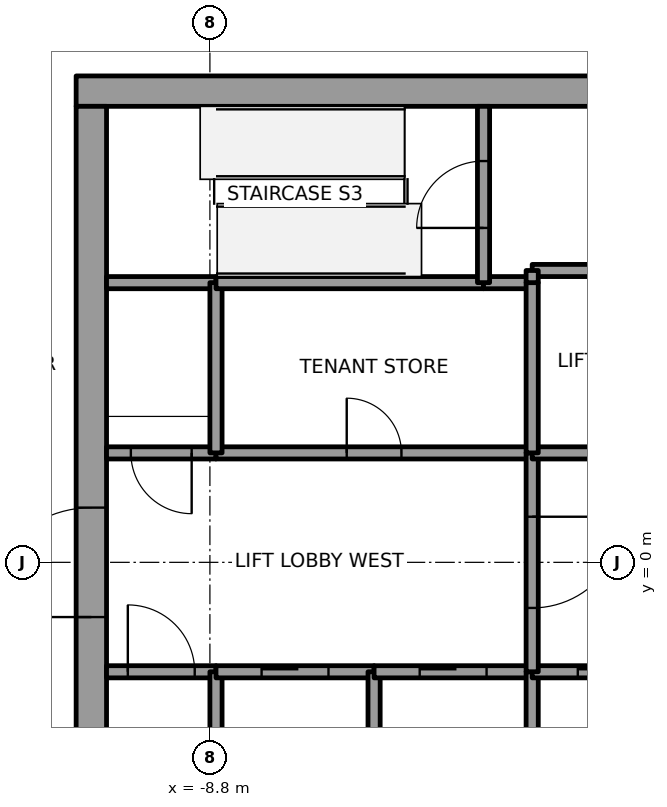
"""IFC4 building model, lengths in metres.
Left out: names, types, materials, properties, quantities, classifications, styles, units other than length and angle.
Written with IfcOpenShell. Run it as: python <this file> out.ifc"""

import sys

from ifc_helpers import new_model, si_unit, direction, frame, frame_2d, origin, place, context, subcontext, project, spatial, rectangle, extrude, element, fill, save


model = new_model("IFC4")
c1 = context("Model", 3, precision=1e-05, world=origin(), true_north=direction((0.0, 1.0)))
c2 = subcontext(c1, "Body", "Model", "MODEL_VIEW")
j1 = project(units=[si_unit("LENGTHUNIT", "METRE"), si_unit("PLANEANGLEUNIT", "RADIAN")], contexts=[c1])
p1 = place(None, origin())
s1 = spatial("IfcSite", under=j1, at=p1, CompositionType="ELEMENT")
p2 = place(p1, origin())
s2 = spatial("IfcBuilding", under=s1, at=p2, CompositionType="ELEMENT")
p3 = place(p2, frame((0.0, 0.0, 263.0)))
s3 = spatial("IfcBuildingStorey", under=s2, at=p3, CompositionType="ELEMENT", Elevation=263.0)
p4 = place(p3, frame((-11.0, 7.75, 0.0), z_axis=(0.0, 0.0, 1.0), x_axis=(1.0, 0.0, 0.0)))
e1 = element("IfcWall", 1, at=p4, inside=s3, PredefinedType="SHEAR", context=c2, shape_type="SweptSolid", body=[
    extrude(rectangle(XDim=22.0, YDim=0.5, at=frame_2d((11.0, 0.0))), origin(), (0.0, 0.0, 1.0), 4.0),
])
p5 = place(p4, frame((10.45, 0.0, 0.0)))
e2 = element("IfcOpeningElement", 2, at=p5, cuts=e1, PredefinedType="OPENING", context=c2, shape_type="SweptSolid", body=[
    extrude(rectangle(XDim=1.1, YDim=2.1, at=frame_2d((0.55, 1.05))), frame((0.0, 0.25, 0.0), z_axis=(0.0, -1.0, 0.0), x_axis=(1.0, 0.0, 0.0)), (0.0, 0.0, 1.0), 0.5),
])
p6 = place(p3, frame((-10.75, -7.5, 0.0), z_axis=(0.0, 0.0, 1.0), x_axis=(0.0, 1.0, 0.0)))
e3 = element("IfcWall", 3, at=p6, inside=s3, PredefinedType="SHEAR", context=c2, shape_type="SweptSolid", body=[
    extrude(rectangle(XDim=15.0, YDim=0.5, at=frame_2d((7.5, 0.0))), origin(), (0.0, 0.0, 1.0), 4.0),
])
p7 = place(p6, frame((6.6, 0.0, 0.0)))
e4 = element("IfcOpeningElement", 4, at=p7, cuts=e3, PredefinedType="OPENING", context=c2, shape_type="SweptSolid", body=[
    extrude(rectangle(XDim=1.8, YDim=2.1, at=frame_2d((0.9, 1.05))), frame((0.0, 0.25, 0.0), z_axis=(0.0, -1.0, 0.0), x_axis=(1.0, 0.0, 0.0)), (0.0, 0.0, 1.0), 0.5),
])
p8 = place(p3, frame((-10.5, -1.8, 0.0), z_axis=(0.0, 0.0, 1.0), x_axis=(1.0, 0.0, 0.0)))
e5 = element("IfcWall", 5, at=p8, inside=s3, PredefinedType="SOLIDWALL", context=c2, shape_type="SweptSolid", body=[
    extrude(rectangle(XDim=1.8, YDim=0.2, at=frame_2d((0.9, 0.0))), origin(), (0.0, 0.0, 1.0), 3.85),
])
p9 = place(p8, frame((0.35, 0.0, 0.0)))
e6 = element("IfcOpeningElement", 6, at=p9, cuts=e5, PredefinedType="OPENING", context=c2, shape_type="SweptSolid", body=[
    extrude(rectangle(XDim=1.1, YDim=2.1, at=frame_2d((0.55, 1.05))), frame((0.0, 0.1, 0.0), z_axis=(0.0, -1.0, 0.0), x_axis=(1.0, 0.0, 0.0)), (0.0, 0.0, 1.0), 0.2),
])
p10 = place(p3, frame((-8.7, 1.8, 0.0), z_axis=(0.0, 0.0, 1.0), x_axis=(-1.0, 0.0, 0.0)))
e7 = element("IfcWall", 7, at=p10, inside=s3, PredefinedType="SOLIDWALL", context=c2, shape_type="SweptSolid", body=[
    extrude(rectangle(XDim=1.8, YDim=0.2, at=frame_2d((0.9, 0.0))), origin(), (0.0, 0.0, 1.0), 3.85),
])
p11 = place(p10, frame((0.4, 0.0, 0.0)))
e8 = element("IfcOpeningElement", 8, at=p11, cuts=e7, PredefinedType="OPENING", context=c2, shape_type="SweptSolid", body=[
    extrude(rectangle(XDim=1.0, YDim=2.1, at=frame_2d((0.5, 1.05))), frame((0.0, 0.1, 0.0), z_axis=(0.0, -1.0, 0.0), x_axis=(1.0, 0.0, 0.0)), (0.0, 0.0, 1.0), 0.2),
])
p12 = place(p3, frame((-8.7, 4.6, 0.0), z_axis=(0.0, 0.0, 1.0), x_axis=(-1.0, 0.0, 0.0)))
e9 = element("IfcWall", 9, at=p12, inside=s3, PredefinedType="SOLIDWALL", context=c2, shape_type="SweptSolid", body=[
    extrude(rectangle(XDim=1.8, YDim=0.2, at=frame_2d((0.9, 0.0))), origin(), (0.0, 0.0, 1.0), 3.85),
])
p13 = place(p3, frame((-8.7, -4.6, 0.0), z_axis=(0.0, 0.0, 1.0), x_axis=(0.0, 1.0, 0.0)))
e10 = element("IfcWall", 10, at=p13, inside=s3, PredefinedType="SOLIDWALL", context=c2, shape_type="SweptSolid", body=[
    extrude(rectangle(XDim=2.8, YDim=0.2, at=frame_2d((1.4, 0.0))), origin(), (0.0, 0.0, 1.0), 3.85),
])
p14 = place(p3, frame((-8.7, -1.8, 0.0), z_axis=(0.0, 0.0, 1.0), x_axis=(1.0, 0.0, 0.0)))
e11 = element("IfcWall", 11, at=p14, inside=s3, PredefinedType="SOLIDWALL", context=c2, shape_type="SweptSolid", body=[
    extrude(rectangle(XDim=2.6, YDim=0.2, at=frame_2d((1.3, 0.0))), origin(), (0.0, 0.0, 1.0), 3.85),
])
p15 = place(p14, frame((0.75, 0.0, 0.0)))
e12 = element("IfcOpeningElement", 12, at=p15, cuts=e11, PredefinedType="OPENING", context=c2, shape_type="SweptSolid", body=[
    extrude(rectangle(XDim=1.1, YDim=2.1, at=frame_2d((0.55, 1.05))), frame((0.0, 0.1, 0.0), z_axis=(0.0, -1.0, 0.0), x_axis=(1.0, 0.0, 0.0)), (0.0, 0.0, 1.0), 0.2),
])
p16 = place(p3, frame((-8.7, 1.8, 0.0), z_axis=(0.0, 0.0, 1.0), x_axis=(1.0, 0.0, 0.0)))
e13 = element("IfcWall", 13, at=p16, inside=s3, PredefinedType="SOLIDWALL", context=c2, shape_type="SweptSolid", body=[
    extrude(rectangle(XDim=5.2, YDim=0.2, at=frame_2d((2.6, 0.0))), origin(), (0.0, 0.0, 1.0), 3.85),
])
p17 = place(p16, frame((2.15, 0.0, 0.0)))
e14 = element("IfcOpeningElement", 14, at=p17, cuts=e13, PredefinedType="OPENING", context=c2, shape_type="SweptSolid", body=[
    extrude(rectangle(XDim=0.9, YDim=2.1, at=frame_2d((0.45, 1.05))), frame((0.0, 0.1, 0.0), z_axis=(0.0, -1.0, 0.0), x_axis=(1.0, 0.0, 0.0)), (0.0, 0.0, 1.0), 0.2),
])
p18 = place(p3, frame((-8.7, 4.6, 0.0), z_axis=(0.0, 0.0, 1.0), x_axis=(0.0, -1.0, 0.0)))
e15 = element("IfcWall", 15, at=p18, inside=s3, PredefinedType="SOLIDWALL", context=c2, shape_type="SweptSolid", body=[
    extrude(rectangle(XDim=2.8, YDim=0.2, at=frame_2d((1.4, 0.0))), origin(), (0.0, 0.0, 1.0), 3.85),
])
p19 = place(p3, frame((-4.3, 4.6, 0.0), z_axis=(0.0, 0.0, 1.0), x_axis=(-1.0, 0.0, 0.0)))
e16 = element("IfcWall", 16, at=p19, inside=s3, PredefinedType="SOLIDWALL", context=c2, shape_type="SweptSolid", body=[
    extrude(rectangle(XDim=4.4, YDim=0.2, at=frame_2d((2.2, 0.0))), origin(), (0.0, 0.0, 1.0), 3.85),
])
p20 = place(p3, frame((-6.1, -4.6, 0.0), z_axis=(0.0, 0.0, 1.0), x_axis=(0.0, 1.0, 0.0)))
e17 = element("IfcWall", 17, at=p20, inside=s3, PredefinedType="SOLIDWALL", context=c2, shape_type="SweptSolid", body=[
    extrude(rectangle(XDim=2.8, YDim=0.2, at=frame_2d((1.4, 0.0))), origin(), (0.0, 0.0, 1.0), 3.85),
])
p21 = place(p3, frame((-6.1, -1.8, 0.0), z_axis=(0.0, 0.0, 1.0), x_axis=(1.0, 0.0, 0.0)))
e18 = element("IfcWall", 18, at=p21, inside=s3, PredefinedType="SOLIDWALL", context=c2, shape_type="SweptSolid", body=[
    extrude(rectangle(XDim=2.6, YDim=0.2, at=frame_2d((1.3, 0.0))), origin(), (0.0, 0.0, 1.0), 3.85),
])
p22 = place(p21, frame((0.75, 0.0, 0.0)))
e19 = element("IfcOpeningElement", 19, at=p22, cuts=e18, PredefinedType="OPENING", context=c2, shape_type="SweptSolid", body=[
    extrude(rectangle(XDim=1.1, YDim=2.1, at=frame_2d((0.55, 1.05))), frame((0.0, 0.1, 0.0), z_axis=(0.0, -1.0, 0.0), x_axis=(1.0, 0.0, 0.0)), (0.0, 0.0, 1.0), 0.2),
])
p23 = place(p3, frame((-3.5, 4.6, 0.0), z_axis=(0.0, 0.0, 1.0), x_axis=(-1.0, 0.0, 0.0)))
e20 = element("IfcWall", 20, at=p23, inside=s3, PredefinedType="SOLIDWALL", context=c2, shape_type="SweptSolid", body=[
    extrude(rectangle(XDim=0.8, YDim=0.2, at=frame_2d((0.4, 0.0))), origin(), (0.0, 0.0, 1.0), 3.85),
])
p24 = place(p3, frame((-4.3, 4.6, 0.0), z_axis=(0.0, 0.0, 1.0), x_axis=(0.0, 1.0, 0.0)))
e21 = element("IfcWall", 21, at=p24, inside=s3, PredefinedType="SOLIDWALL", context=c2, shape_type="SweptSolid", body=[
    extrude(rectangle(XDim=2.9, YDim=0.2, at=frame_2d((1.45, 0.0))), origin(), (0.0, 0.0, 1.0), 3.85),
])
p25 = place(p24, frame((0.9, 0.0, 0.0)))
e22 = element("IfcOpeningElement", 22, at=p25, cuts=e21, PredefinedType="OPENING", context=c2, shape_type="SweptSolid", body=[
    extrude(rectangle(XDim=1.1, YDim=2.1, at=frame_2d((0.55, 1.05))), frame((0.0, 0.1, 0.0), z_axis=(0.0, -1.0, 0.0), x_axis=(1.0, 0.0, 0.0)), (0.0, 0.0, 1.0), 0.2),
])
p26 = place(p3, frame((-3.5, -4.6, 0.0), z_axis=(0.0, 0.0, 1.0), x_axis=(0.0, 1.0, 0.0)))
e23 = element("IfcWall", 23, at=p26, inside=s3, PredefinedType="SOLIDWALL", context=c2, shape_type="SweptSolid", body=[
    extrude(rectangle(XDim=2.8, YDim=0.2, at=frame_2d((1.4, 0.0))), origin(), (0.0, 0.0, 1.0), 3.85),
])
p27 = place(p3, frame((-3.5, -1.8, 0.0), z_axis=(0.0, 0.0, 1.0), x_axis=(1.0, 0.0, 0.0)))
e24 = element("IfcWall", 24, at=p27, inside=s3, PredefinedType="SOLIDWALL", context=c2, shape_type="SweptSolid", body=[
    extrude(rectangle(XDim=2.6, YDim=0.2, at=frame_2d((1.3, 0.0))), origin(), (0.0, 0.0, 1.0), 3.85),
])
p28 = place(p27, frame((0.75, 0.0, 0.0)))
e25 = element("IfcOpeningElement", 25, at=p28, cuts=e24, PredefinedType="OPENING", context=c2, shape_type="SweptSolid", body=[
    extrude(rectangle(XDim=1.1, YDim=2.1, at=frame_2d((0.55, 1.05))), frame((0.0, 0.1, 0.0), z_axis=(0.0, -1.0, 0.0), x_axis=(1.0, 0.0, 0.0)), (0.0, 0.0, 1.0), 0.2),
])
p29 = place(p3, frame((-3.5, 1.8, 0.0), z_axis=(0.0, 0.0, 1.0), x_axis=(0.0, -1.0, 0.0)))
e26 = element("IfcWall", 26, at=p29, inside=s3, PredefinedType="SOLIDWALL", context=c2, shape_type="SweptSolid", body=[
    extrude(rectangle(XDim=3.6, YDim=0.2, at=frame_2d((1.8, 0.0))), origin(), (0.0, 0.0, 1.0), 3.85),
])
p30 = place(p29, frame((1.05, 0.0, 0.0)))
e27 = element("IfcOpeningElement", 27, at=p30, cuts=e26, PredefinedType="OPENING", context=c2, shape_type="SweptSolid", body=[
    extrude(rectangle(XDim=1.5, YDim=2.1, at=frame_2d((0.75, 1.05))), frame((0.0, 0.1, 0.0), z_axis=(0.0, -1.0, 0.0), x_axis=(1.0, 0.0, 0.0)), (0.0, 0.0, 1.0), 0.2),
])
p31 = place(p3, frame((-0.9, 1.8, 0.0), z_axis=(0.0, 0.0, 1.0), x_axis=(-1.0, 0.0, 0.0)))
e28 = element("IfcWall", 28, at=p31, inside=s3, PredefinedType="SOLIDWALL", context=c2, shape_type="SweptSolid", body=[
    extrude(rectangle(XDim=2.6, YDim=0.2, at=frame_2d((1.3, 0.0))), origin(), (0.0, 0.0, 1.0), 3.85),
])
p32 = place(p3, frame((-3.5, 1.8, 0.0), z_axis=(0.0, 0.0, 1.0), x_axis=(0.0, 1.0, 0.0)))
e29 = element("IfcWall", 29, at=p32, inside=s3, PredefinedType="SOLIDWALL", context=c2, shape_type="SweptSolid", body=[
    extrude(rectangle(XDim=2.8, YDim=0.2, at=frame_2d((1.4, 0.0))), origin(), (0.0, 0.0, 1.0), 3.85),
])
p33 = place(p3, frame((-0.9, 4.8, 0.0), z_axis=(0.0, 0.0, 1.0), x_axis=(-1.0, 0.0, 0.0)))
e30 = element("IfcWall", 30, at=p33, inside=s3, PredefinedType="SOLIDWALL", context=c2, shape_type="SweptSolid", body=[
    extrude(rectangle(XDim=2.6, YDim=0.2, at=frame_2d((1.3, 0.0))), origin(), (0.0, 0.0, 1.0), 3.85),
])
p34 = place(p3, frame((-3.5, 4.8, 0.0), z_axis=(0.0, 0.0, 1.0), x_axis=(0.0, -1.0, 0.0)))
e31 = element("IfcWall", 31, at=p34, inside=s3, PredefinedType="SOLIDWALL", context=c2, shape_type="SweptSolid", body=[
    extrude(rectangle(XDim=0.2, YDim=0.2, at=frame_2d((0.1, 0.0))), origin(), (0.0, 0.0, 1.0), 3.85),
])
p35 = place(p15, origin())
e32 = element("IfcDoor", 32, at=p35, inside=s3, OperationType="SLIDING_TO_RIGHT", PredefinedType="DOOR", context=c2, shape_type="SweptSolid", body=[
    extrude(rectangle(XDim=1.1, YDim=2.1, at=frame_2d((0.55, 1.05))), frame((0.0, 0.025, 0.0), z_axis=(0.0, -1.0, 0.0), x_axis=(1.0, 0.0, 0.0)), (0.0, 0.0, 1.0), 0.05),
])
fill(e12, e32)
p36 = place(p22, origin())
e33 = element("IfcDoor", 33, at=p36, inside=s3, OperationType="SLIDING_TO_RIGHT", PredefinedType="DOOR", context=c2, shape_type="SweptSolid", body=[
    extrude(rectangle(XDim=1.1, YDim=2.1, at=frame_2d((0.55, 1.05))), frame((0.0, 0.025, 0.0), z_axis=(0.0, -1.0, 0.0), x_axis=(1.0, 0.0, 0.0)), (0.0, 0.0, 1.0), 0.05),
])
fill(e19, e33)
p37 = place(p28, origin())
e34 = element("IfcDoor", 34, at=p37, inside=s3, OperationType="SLIDING_TO_LEFT", PredefinedType="DOOR", context=c2, shape_type="SweptSolid", body=[
    extrude(rectangle(XDim=1.1, YDim=2.1, at=frame_2d((0.55, 1.05))), frame((0.0, 0.025, 0.0), z_axis=(0.0, -1.0, 0.0), x_axis=(1.0, 0.0, 0.0)), (0.0, 0.0, 1.0), 0.05),
])
fill(e25, e34)
p38 = place(p30, origin())
e35 = element("IfcDoor", 35, at=p38, inside=s3, OperationType="DOUBLE_DOOR_SINGLE_SWING", PredefinedType="DOOR", context=c2, shape_type="SweptSolid", body=[
    extrude(rectangle(XDim=1.5, YDim=2.1, at=frame_2d((0.75, 1.05))), frame((0.0, 0.025, 0.0), z_axis=(0.0, -1.0, 0.0), x_axis=(1.0, 0.0, 0.0)), (0.0, 0.0, 1.0), 0.05),
])
fill(e27, e35)
p39 = place(p9, origin())
e36 = element("IfcDoor", 36, at=p39, inside=s3, OperationType="SINGLE_SWING_LEFT", PredefinedType="DOOR", context=c2, shape_type="SweptSolid", body=[
    extrude(rectangle(XDim=1.1, YDim=2.1, at=frame_2d((0.55, 1.05))), frame((0.0, 0.025, 0.0), z_axis=(0.0, -1.0, 0.0), x_axis=(1.0, 0.0, 0.0)), (0.0, 0.0, 1.0), 0.05),
])
fill(e6, e36)
p40 = place(p11, origin())
e37 = element("IfcDoor", 37, at=p40, inside=s3, OperationType="SINGLE_SWING_LEFT", PredefinedType="DOOR", context=c2, shape_type="SweptSolid", body=[
    extrude(rectangle(XDim=1.0, YDim=2.1, at=frame_2d((0.5, 1.05))), frame((0.0, 0.025, 0.0), z_axis=(0.0, -1.0, 0.0), x_axis=(1.0, 0.0, 0.0)), (0.0, 0.0, 1.0), 0.05),
])
fill(e8, e37)
p41 = place(p25, origin())
e38 = element("IfcDoor", 38, at=p41, inside=s3, OperationType="SINGLE_SWING_LEFT", PredefinedType="DOOR", context=c2, shape_type="SweptSolid", body=[
    extrude(rectangle(XDim=1.1, YDim=2.1, at=frame_2d((0.55, 1.05))), frame((0.0, 0.025, 0.0), z_axis=(0.0, -1.0, 0.0), x_axis=(1.0, 0.0, 0.0)), (0.0, 0.0, 1.0), 0.05),
])
fill(e22, e38)
p42 = place(p17, origin())
e39 = element("IfcDoor", 39, at=p42, inside=s3, OperationType="SINGLE_SWING_RIGHT", PredefinedType="DOOR", context=c2, shape_type="SweptSolid", body=[
    extrude(rectangle(XDim=0.9, YDim=2.1, at=frame_2d((0.45, 1.05))), frame((0.0, 0.025, 0.0), z_axis=(0.0, -1.0, 0.0), x_axis=(1.0, 0.0, 0.0)), (0.0, 0.0, 1.0), 0.05),
])
fill(e14, e39)
p43 = place(p7, origin())
e40 = element("IfcDoor", 40, at=p43, inside=s3, OperationType="DOUBLE_DOOR_SINGLE_SWING", PredefinedType="DOOR", context=c2, shape_type="SweptSolid", body=[
    extrude(rectangle(XDim=1.8, YDim=2.1, at=frame_2d((0.9, 1.05))), frame((0.0, 0.025, 0.0), z_axis=(0.0, -1.0, 0.0), x_axis=(1.0, 0.0, 0.0)), (0.0, 0.0, 1.0), 0.05),
])
fill(e4, e40)
save(model, sys.argv[1])
